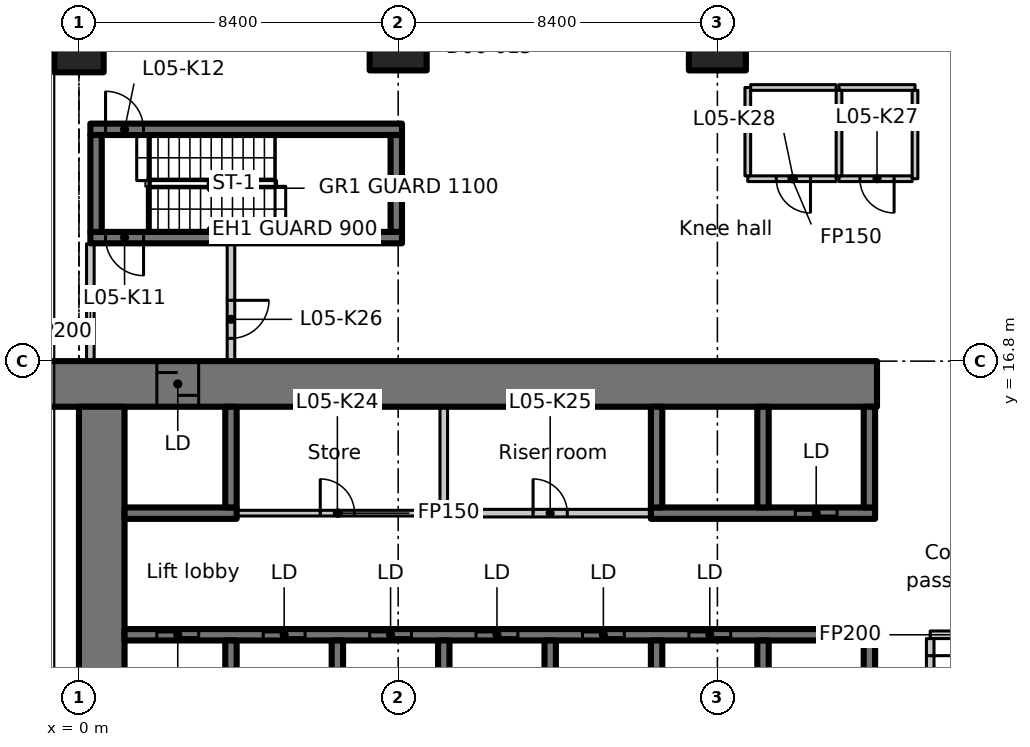
"""IFC4 building model, lengths in metres.
Left out: names, types, materials, properties, quantities, classifications, styles, units other than length and angle.
Written with IfcOpenShell. Run it as: python <this file> out.ifc"""

import sys

from ifc_helpers import new_model, si_unit, direction, frame, frame_2d, origin, origin_2d, place, context, subcontext, project, spatial, rectangle, extrude, element, fill, save


model = new_model("IFC4")
c1 = context("Model", 3, precision=1e-05, world=origin(), true_north=direction((0.0, 1.0)))
c2 = subcontext(c1, "Body", "Model", "MODEL_VIEW")
j1 = project(units=[si_unit("LENGTHUNIT", "METRE"), si_unit("PLANEANGLEUNIT", "RADIAN")], contexts=[c1])
p1 = place(None, origin())
s1 = spatial("IfcSite", under=j1, at=p1, CompositionType="ELEMENT")
p2 = place(p1, origin())
s2 = spatial("IfcBuilding", under=s1, at=p2, CompositionType="ELEMENT")
p3 = place(p2, frame((0.0, 0.0, 32.0)))
s3 = spatial("IfcBuildingStorey", under=s2, at=p3, CompositionType="ELEMENT", Elevation=32.0)
p4 = place(p3, frame((0.0, 25.2, 0.0), z_axis=(0.0, 0.0, 1.0), x_axis=(1.0, 0.0, 0.0)))
e1 = element("IfcColumn", 1, at=p4, inside=s3, PredefinedType="COLUMN", context=c2, shape_type="SweptSolid", body=[
    extrude(rectangle(XDim=1.3, YDim=1.6, at=origin_2d()), origin(), (0.0, 0.0, 1.0), 4.25),
])
for number, where, z_axis, x_axis in (
    (2, (8.4, 25.2, 0.0), (0.0, 0.0, 1.0), (1.0, 0.0, 0.0)),
    (3, (16.8, 25.2, 0.0), (0.0, 0.0, 1.0), (1.0, 0.0, 0.0)),
):
    element("IfcColumn", number, at=place(p3, frame(where, z_axis=z_axis, x_axis=x_axis)), inside=s3, PredefinedType="COLUMN", context=c2, shape_type="SweptSolid", body=[
        extrude(rectangle(XDim=1.5, YDim=1.5, at=origin_2d()), origin(), (0.0, 0.0, 1.0), 4.25),
    ])
p5 = place(p3, frame((-1.1, 16.2, 0.0), z_axis=(0.0, 0.0, 1.0), x_axis=(1.0, 0.0, 0.0)))
e4 = element("IfcWall", 4, at=p5, inside=s3, PredefinedType="SHEAR", context=c2, shape_type="SweptSolid", body=[
    extrude(rectangle(XDim=22.1, YDim=1.2, at=frame_2d((11.05, 0.0))), origin(), (0.0, 0.0, 1.0), 4.25),
])
p6 = place(p5, frame((3.15, 0.0, 0.0)))
e5 = element("IfcOpeningElement", 5, at=p6, cuts=e4, PredefinedType="OPENING", context=c2, shape_type="SweptSolid", body=[
    extrude(rectangle(XDim=1.1, YDim=2.3, at=frame_2d((0.55, 1.15))), frame((0.0, 0.61, 0.0), z_axis=(0.0, -1.0, 0.0), x_axis=(1.0, 0.0, 0.0)), (0.0, 0.0, 1.0), 1.22),
])
p7 = place(p3, frame((0.6, 6.736, 0.0), z_axis=(0.0, 0.0, 1.0), x_axis=(0.0, 1.0, 0.0)))
e6 = element("IfcWall", 6, at=p7, inside=s3, PredefinedType="SHEAR", context=c2, shape_type="SweptSolid", body=[
    extrude(rectangle(XDim=8.864, YDim=1.2, at=frame_2d((4.432, 0.0))), origin(), (0.0, 0.0, 1.0), 4.25),
])
p8 = place(p3, frame((1.2, 9.6, 0.0), z_axis=(0.0, 0.0, 1.0), x_axis=(1.0, 0.0, 0.0)))
e7 = element("IfcWall", 7, at=p8, inside=s3, PredefinedType="SHEAR", context=c2, shape_type="SweptSolid", body=[
    extrude(rectangle(XDim=19.75, YDim=0.3, at=frame_2d((9.875, 0.0))), origin(), (0.0, 0.0, 1.0), 4.25),
])
p9 = place(p8, frame((0.85, 0.0, 0.0)))
e8 = element("IfcOpeningElement", 8, at=p9, cuts=e7, PredefinedType="OPENING", context=c2, shape_type="SweptSolid", body=[
    extrude(rectangle(XDim=1.1, YDim=2.3, at=frame_2d((0.55, 1.15))), frame((0.0, 0.16, 0.0), z_axis=(0.0, -1.0, 0.0), x_axis=(1.0, 0.0, 0.0)), (0.0, 0.0, 1.0), 0.32),
])
p10 = place(p8, frame((3.65, 0.0, 0.0)))
e9 = element("IfcOpeningElement", 9, at=p10, cuts=e7, PredefinedType="OPENING", context=c2, shape_type="SweptSolid", body=[
    extrude(rectangle(XDim=1.1, YDim=2.3, at=frame_2d((0.55, 1.15))), frame((0.0, 0.16, 0.0), z_axis=(0.0, -1.0, 0.0), x_axis=(1.0, 0.0, 0.0)), (0.0, 0.0, 1.0), 0.32),
])
p11 = place(p8, frame((6.45, 0.0, 0.0)))
e10 = element("IfcOpeningElement", 10, at=p11, cuts=e7, PredefinedType="OPENING", context=c2, shape_type="SweptSolid", body=[
    extrude(rectangle(XDim=1.1, YDim=2.3, at=frame_2d((0.55, 1.15))), frame((0.0, 0.16, 0.0), z_axis=(0.0, -1.0, 0.0), x_axis=(1.0, 0.0, 0.0)), (0.0, 0.0, 1.0), 0.32),
])
p12 = place(p8, frame((9.25, 0.0, 0.0)))
e11 = element("IfcOpeningElement", 11, at=p12, cuts=e7, PredefinedType="OPENING", context=c2, shape_type="SweptSolid", body=[
    extrude(rectangle(XDim=1.1, YDim=2.3, at=frame_2d((0.55, 1.15))), frame((0.0, 0.16, 0.0), z_axis=(0.0, -1.0, 0.0), x_axis=(1.0, 0.0, 0.0)), (0.0, 0.0, 1.0), 0.32),
])
p13 = place(p8, frame((12.05, 0.0, 0.0)))
e12 = element("IfcOpeningElement", 12, at=p13, cuts=e7, PredefinedType="OPENING", context=c2, shape_type="SweptSolid", body=[
    extrude(rectangle(XDim=1.1, YDim=2.3, at=frame_2d((0.55, 1.15))), frame((0.0, 0.16, 0.0), z_axis=(0.0, -1.0, 0.0), x_axis=(1.0, 0.0, 0.0)), (0.0, 0.0, 1.0), 0.32),
])
p14 = place(p8, frame((14.85, 0.0, 0.0)))
e13 = element("IfcOpeningElement", 13, at=p14, cuts=e7, PredefinedType="OPENING", context=c2, shape_type="SweptSolid", body=[
    extrude(rectangle(XDim=1.1, YDim=2.3, at=frame_2d((0.55, 1.15))), frame((0.0, 0.16, 0.0), z_axis=(0.0, -1.0, 0.0), x_axis=(1.0, 0.0, 0.0)), (0.0, 0.0, 1.0), 0.32),
])
for number, where, z_axis, x_axis in (
    (14, (4.0, 7.15, 0.0), (0.0, 0.0, 1.0), (0.0, 1.0, 0.0)),
    (15, (6.8, 7.15, 0.0), (0.0, 0.0, 1.0), (0.0, 1.0, 0.0)),
    (16, (9.6, 7.15, 0.0), (0.0, 0.0, 1.0), (0.0, 1.0, 0.0)),
    (17, (12.4, 7.15, 0.0), (0.0, 0.0, 1.0), (0.0, 1.0, 0.0)),
    (18, (15.2, 7.15, 0.0), (0.0, 0.0, 1.0), (0.0, 1.0, 0.0)),
    (19, (18.0, 7.15, 0.0), (0.0, 0.0, 1.0), (0.0, 1.0, 0.0)),
    (20, (20.8, 7.15, 0.0), (0.0, 0.0, 1.0), (0.0, 1.0, 0.0)),
):
    element("IfcWall", number, at=place(p3, frame(where, z_axis=z_axis, x_axis=x_axis)), inside=s3, PredefinedType="SHEAR", context=c2, shape_type="SweptSolid", body=[
        extrude(rectangle(XDim=2.3, YDim=0.3, at=frame_2d((1.15, 0.0))), origin(), (0.0, 0.0, 1.0), 4.25),
    ])
p15 = place(p3, frame((1.2, 12.8, 0.0), z_axis=(0.0, 0.0, 1.0), x_axis=(1.0, 0.0, 0.0)))
e21 = element("IfcWall", 21, at=p15, inside=s3, PredefinedType="SHEAR", context=c2, shape_type="SweptSolid", body=[
    extrude(rectangle(XDim=2.95, YDim=0.3, at=frame_2d((1.475, 0.0))), origin(), (0.0, 0.0, 1.0), 4.25),
])
p16 = place(p3, frame((4.0, 12.95, 0.0), z_axis=(0.0, 0.0, 1.0), x_axis=(0.0, 1.0, 0.0)))
e22 = element("IfcWall", 22, at=p16, inside=s3, PredefinedType="SHEAR", context=c2, shape_type="SweptSolid", body=[
    extrude(rectangle(XDim=2.65, YDim=0.3, at=frame_2d((1.325, 0.0))), origin(), (0.0, 0.0, 1.0), 4.25),
])
p17 = place(p3, frame((15.05, 12.8, 0.0), z_axis=(0.0, 0.0, 1.0), x_axis=(1.0, 0.0, 0.0)))
e23 = element("IfcWall", 23, at=p17, inside=s3, PredefinedType="SHEAR", context=c2, shape_type="SweptSolid", body=[
    extrude(rectangle(XDim=5.9, YDim=0.3, at=frame_2d((2.95, 0.0))), origin(), (0.0, 0.0, 1.0), 4.25),
])
p18 = place(p17, frame((3.8, 0.0, 0.0)))
e24 = element("IfcOpeningElement", 24, at=p18, cuts=e23, PredefinedType="OPENING", context=c2, shape_type="SweptSolid", body=[
    extrude(rectangle(XDim=1.1, YDim=2.3, at=frame_2d((0.55, 1.15))), frame((0.0, 0.16, 0.0), z_axis=(0.0, -1.0, 0.0), x_axis=(1.0, 0.0, 0.0)), (0.0, 0.0, 1.0), 0.32),
])
for number, where, z_axis, x_axis in (
    (25, (15.2, 12.95, 0.0), (0.0, 0.0, 1.0), (0.0, 1.0, 0.0)),
    (26, (18.0, 12.95, 0.0), (0.0, 0.0, 1.0), (0.0, 1.0, 0.0)),
    (27, (20.8, 12.95, 0.0), (0.0, 0.0, 1.0), (0.0, 1.0, 0.0)),
):
    element("IfcWall", number, at=place(p3, frame(where, z_axis=z_axis, x_axis=x_axis)), inside=s3, PredefinedType="SHEAR", context=c2, shape_type="SweptSolid", body=[
        extrude(rectangle(XDim=2.65, YDim=0.3, at=frame_2d((1.325, 0.0))), origin(), (0.0, 0.0, 1.0), 4.25),
    ])
p19 = place(p3, frame((8.5, 20.05, 0.0), z_axis=(0.0, 0.0, 1.0), x_axis=(-1.0, 0.0, 0.0)))
e28 = element("IfcWall", 28, at=p19, inside=s3, PredefinedType="SHEAR", context=c2, shape_type="SweptSolid", body=[
    extrude(rectangle(XDim=8.2, YDim=0.3, at=frame_2d((4.1, 0.0))), origin(), (0.0, 0.0, 1.0), 4.25),
])
p20 = place(p19, frame((6.8, 0.0, 0.0)))
e29 = element("IfcOpeningElement", 29, at=p20, cuts=e28, PredefinedType="OPENING", context=c2, shape_type="SweptSolid", body=[
    extrude(rectangle(XDim=1.0, YDim=2.1, at=frame_2d((0.5, 1.05))), frame((0.0, 0.16, 0.0), z_axis=(0.0, -1.0, 0.0), x_axis=(1.0, 0.0, 0.0)), (0.0, 0.0, 1.0), 0.32),
])
p21 = place(p3, frame((0.3, 22.9, 0.0), z_axis=(0.0, 0.0, 1.0), x_axis=(1.0, 0.0, 0.0)))
e30 = element("IfcWall", 30, at=p21, inside=s3, PredefinedType="SHEAR", context=c2, shape_type="SweptSolid", body=[
    extrude(rectangle(XDim=8.2, YDim=0.3, at=frame_2d((4.1, 0.0))), origin(), (0.0, 0.0, 1.0), 4.25),
])
p22 = place(p21, frame((0.4, 0.0, 0.0)))
e31 = element("IfcOpeningElement", 31, at=p22, cuts=e30, PredefinedType="OPENING", context=c2, shape_type="SweptSolid", body=[
    extrude(rectangle(XDim=1.0, YDim=2.1, at=frame_2d((0.5, 1.05))), frame((0.0, 0.16, 0.0), z_axis=(0.0, -1.0, 0.0), x_axis=(1.0, 0.0, 0.0)), (0.0, 0.0, 1.0), 0.32),
])
for number, where, z_axis, x_axis in (
    (32, (0.45, 20.2, 0.0), (0.0, 0.0, 1.0), (0.0, 1.0, 0.0)),
    (33, (8.35, 20.2, 0.0), (0.0, 0.0, 1.0), (0.0, 1.0, 0.0)),
):
    element("IfcWall", number, at=place(p3, frame(where, z_axis=z_axis, x_axis=x_axis)), inside=s3, PredefinedType="SHEAR", context=c2, shape_type="SweptSolid", body=[
        extrude(rectangle(XDim=2.55, YDim=0.3, at=frame_2d((1.275, 0.0))), origin(), (0.0, 0.0, 1.0), 4.25),
    ])
p23 = place(p3, frame((0.3, 16.812, 0.0), z_axis=(0.0, 0.0, 1.0), x_axis=(0.0, 1.0, 0.0)))
e34 = element("IfcWall", 34, at=p23, inside=s3, PredefinedType="PARTITIONING", context=c2, shape_type="SweptSolid", body=[
    extrude(rectangle(XDim=3.076, YDim=0.2, at=frame_2d((1.538, 0.0))), origin(), (0.0, 0.0, 1.0), 3.88),
])
p24 = place(p3, frame((4.0, 19.888, 0.0), z_axis=(0.0, 0.0, 1.0), x_axis=(0.0, -1.0, 0.0)))
e35 = element("IfcWall", 35, at=p24, inside=s3, PredefinedType="PARTITIONING", context=c2, shape_type="SweptSolid", body=[
    extrude(rectangle(XDim=3.076, YDim=0.2, at=frame_2d((1.538, 0.0))), origin(), (0.0, 0.0, 1.0), 4.25),
])
p25 = place(p24, frame((1.488, 0.0, 0.0)))
e36 = element("IfcOpeningElement", 36, at=p25, cuts=e35, PredefinedType="OPENING", context=c2, shape_type="SweptSolid", body=[
    extrude(rectangle(XDim=1.0, YDim=2.1, at=frame_2d((0.5, 1.05))), frame((0.0, 0.11, 0.0), z_axis=(0.0, -1.0, 0.0), x_axis=(1.0, 0.0, 0.0)), (0.0, 0.0, 1.0), 0.22),
])
p26 = place(p3, frame((9.6, 15.588, 0.0), z_axis=(0.0, 0.0, 1.0), x_axis=(0.0, -1.0, 0.0)))
e37 = element("IfcWall", 37, at=p26, inside=s3, PredefinedType="PARTITIONING", context=c2, shape_type="SweptSolid", body=[
    extrude(rectangle(XDim=2.788, YDim=0.2, at=frame_2d((1.394, 0.0))), origin(), (0.0, 0.0, 1.0), 4.25),
])
p27 = place(p3, frame((9.7, 12.8, 0.0), z_axis=(0.0, 0.0, 1.0), x_axis=(1.0, 0.0, 0.0)))
e38 = element("IfcWall", 38, at=p27, inside=s3, PredefinedType="PARTITIONING", context=c2, shape_type="SweptSolid", body=[
    extrude(rectangle(XDim=5.338, YDim=0.2, at=frame_2d((2.669, 0.0))), origin(), (0.0, 0.0, 1.0), 4.25),
])
p28 = place(p27, frame((2.25, 0.0, 0.0)))
e39 = element("IfcOpeningElement", 39, at=p28, cuts=e38, PredefinedType="OPENING", context=c2, shape_type="SweptSolid", body=[
    extrude(rectangle(XDim=0.9, YDim=2.1, at=frame_2d((0.45, 1.05))), frame((0.0, 0.11, 0.0), z_axis=(0.0, -1.0, 0.0), x_axis=(1.0, 0.0, 0.0)), (0.0, 0.0, 1.0), 0.22),
])
p29 = place(p3, frame((23.988, 9.6, 0.0), z_axis=(0.0, 0.0, 1.0), x_axis=(-1.0, 0.0, 0.0)))
e40 = element("IfcWall", 40, at=p29, inside=s3, PredefinedType="PARTITIONING", context=c2, shape_type="SweptSolid", body=[
    extrude(rectangle(XDim=1.588, YDim=0.2, at=frame_2d((0.794, 0.0))), origin(), (0.0, 0.0, 1.0), 4.25),
])
p30 = place(p3, frame((22.4, 9.5, 0.0), z_axis=(0.0, 0.0, 1.0), x_axis=(0.0, -1.0, 0.0)))
e41 = element("IfcWall", 41, at=p30, inside=s3, PredefinedType="PARTITIONING", context=c2, shape_type="SweptSolid", body=[
    extrude(rectangle(XDim=1.9, YDim=0.2, at=frame_2d((0.95, 0.0))), origin(), (0.0, 0.0, 1.0), 4.25),
])
p31 = place(p30, frame((0.45, 0.0, 0.0)))
e42 = element("IfcOpeningElement", 42, at=p31, cuts=e41, PredefinedType="OPENING", context=c2, shape_type="SweptSolid", body=[
    extrude(rectangle(XDim=0.9, YDim=2.1, at=frame_2d((0.45, 1.05))), frame((0.0, 0.11, 0.0), z_axis=(0.0, -1.0, 0.0), x_axis=(1.0, 0.0, 0.0)), (0.0, 0.0, 1.0), 0.22),
])
p32 = place(p3, frame((4.162, 12.8, 0.0), z_axis=(0.0, 0.0, 1.0), x_axis=(1.0, 0.0, 0.0)))
e43 = element("IfcWall", 43, at=p32, inside=s3, PredefinedType="PARTITIONING", context=c2, shape_type="SweptSolid", body=[
    extrude(rectangle(XDim=5.338, YDim=0.15, at=frame_2d((2.669, 0.0))), origin(), (0.0, 0.0, 1.0), 4.25),
])
p33 = place(p32, frame((2.188, 0.0, 0.0)))
e44 = element("IfcOpeningElement", 44, at=p33, cuts=e43, PredefinedType="OPENING", context=c2, shape_type="SweptSolid", body=[
    extrude(rectangle(XDim=0.9, YDim=2.1, at=frame_2d((0.45, 1.05))), frame((0.0, 0.085, 0.0), z_axis=(0.0, -1.0, 0.0), x_axis=(1.0, 0.0, 0.0)), (0.0, 0.0, 1.0), 0.17),
])
p34 = place(p3, frame((20.0, 24.0, 0.0), z_axis=(0.0, 0.0, 1.0), x_axis=(1.0, 0.0, 0.0)))
e45 = element("IfcWall", 45, at=p34, inside=s3, PredefinedType="PARTITIONING", context=c2, shape_type="SweptSolid", body=[
    extrude(rectangle(XDim=2.0, YDim=0.15, at=frame_2d((1.0, 0.0))), origin(), (0.0, 0.0, 1.0), 4.25),
])
p35 = place(p3, frame((22.0, 23.925, 0.0), z_axis=(0.0, 0.0, 1.0), x_axis=(0.0, -1.0, 0.0)))
e46 = element("IfcWall", 46, at=p35, inside=s3, PredefinedType="PARTITIONING", context=c2, shape_type="SweptSolid", body=[
    extrude(rectangle(XDim=2.325, YDim=0.15, at=frame_2d((1.163, 0.0))), origin(), (0.0, 0.0, 1.0), 4.25),
])
p36 = place(p3, frame((21.925, 21.6, 0.0), z_axis=(0.0, 0.0, 1.0), x_axis=(-1.0, 0.0, 0.0)))
e47 = element("IfcWall", 47, at=p36, inside=s3, PredefinedType="PARTITIONING", context=c2, shape_type="SweptSolid", body=[
    extrude(rectangle(XDim=1.925, YDim=0.15, at=frame_2d((0.962, 0.0))), origin(), (0.0, 0.0, 1.0), 4.25),
])
p37 = place(p36, frame((0.475, 0.0, 0.0)))
e48 = element("IfcOpeningElement", 48, at=p37, cuts=e47, PredefinedType="OPENING", context=c2, shape_type="SweptSolid", body=[
    extrude(rectangle(XDim=0.9, YDim=2.1, at=frame_2d((0.45, 1.05))), frame((0.0, 0.085, 0.0), z_axis=(0.0, -1.0, 0.0), x_axis=(1.0, 0.0, 0.0)), (0.0, 0.0, 1.0), 0.17),
])
p38 = place(p3, frame((20.0, 21.675, 0.0), z_axis=(0.0, 0.0, 1.0), x_axis=(0.0, 1.0, 0.0)))
e49 = element("IfcWall", 49, at=p38, inside=s3, PredefinedType="PARTITIONING", context=c2, shape_type="SweptSolid", body=[
    extrude(rectangle(XDim=2.25, YDim=0.15, at=frame_2d((1.125, 0.0))), origin(), (0.0, 0.0, 1.0), 4.25),
])
p39 = place(p3, frame((19.925, 21.6, 0.0), z_axis=(0.0, 0.0, 1.0), x_axis=(-1.0, 0.0, 0.0)))
e50 = element("IfcWall", 50, at=p39, inside=s3, PredefinedType="PARTITIONING", context=c2, shape_type="SweptSolid", body=[
    extrude(rectangle(XDim=2.325, YDim=0.15, at=frame_2d((1.163, 0.0))), origin(), (0.0, 0.0, 1.0), 4.25),
])
p40 = place(p39, frame((0.675, 0.0, 0.0)))
e51 = element("IfcOpeningElement", 51, at=p40, cuts=e50, PredefinedType="OPENING", context=c2, shape_type="SweptSolid", body=[
    extrude(rectangle(XDim=0.9, YDim=2.1, at=frame_2d((0.45, 1.05))), frame((0.0, 0.085, 0.0), z_axis=(0.0, -1.0, 0.0), x_axis=(1.0, 0.0, 0.0)), (0.0, 0.0, 1.0), 0.17),
])
p41 = place(p3, frame((17.6, 21.675, 0.0), z_axis=(0.0, 0.0, 1.0), x_axis=(0.0, 1.0, 0.0)))
e52 = element("IfcWall", 52, at=p41, inside=s3, PredefinedType="PARTITIONING", context=c2, shape_type="SweptSolid", body=[
    extrude(rectangle(XDim=2.325, YDim=0.15, at=frame_2d((1.163, 0.0))), origin(), (0.0, 0.0, 1.0), 4.25),
])
p42 = place(p3, frame((17.675, 24.0, 0.0), z_axis=(0.0, 0.0, 1.0), x_axis=(1.0, 0.0, 0.0)))
e53 = element("IfcWall", 53, at=p42, inside=s3, PredefinedType="PARTITIONING", context=c2, shape_type="SweptSolid", body=[
    extrude(rectangle(XDim=2.25, YDim=0.15, at=frame_2d((1.125, 0.0))), origin(), (0.0, 0.0, 1.0), 4.25),
])
p43 = place(p9, origin())
e54 = element("IfcDoor", 54, at=p43, inside=s3, OperationType="SLIDING_TO_LEFT", PredefinedType="DOOR", context=c2, shape_type="SweptSolid", body=[
    extrude(rectangle(XDim=1.1, YDim=2.3, at=frame_2d((0.55, 1.15))), frame((0.0, 0.025, 0.0), z_axis=(0.0, -1.0, 0.0), x_axis=(1.0, 0.0, 0.0)), (0.0, 0.0, 1.0), 0.05),
])
fill(e8, e54)
p44 = place(p10, origin())
e55 = element("IfcDoor", 55, at=p44, inside=s3, OperationType="SLIDING_TO_LEFT", PredefinedType="DOOR", context=c2, shape_type="SweptSolid", body=[
    extrude(rectangle(XDim=1.1, YDim=2.3, at=frame_2d((0.55, 1.15))), frame((0.0, 0.025, 0.0), z_axis=(0.0, -1.0, 0.0), x_axis=(1.0, 0.0, 0.0)), (0.0, 0.0, 1.0), 0.05),
])
fill(e9, e55)
p45 = place(p11, origin())
e56 = element("IfcDoor", 56, at=p45, inside=s3, OperationType="SLIDING_TO_LEFT", PredefinedType="DOOR", context=c2, shape_type="SweptSolid", body=[
    extrude(rectangle(XDim=1.1, YDim=2.3, at=frame_2d((0.55, 1.15))), frame((0.0, 0.025, 0.0), z_axis=(0.0, -1.0, 0.0), x_axis=(1.0, 0.0, 0.0)), (0.0, 0.0, 1.0), 0.05),
])
fill(e10, e56)
p46 = place(p12, origin())
e57 = element("IfcDoor", 57, at=p46, inside=s3, OperationType="SLIDING_TO_LEFT", PredefinedType="DOOR", context=c2, shape_type="SweptSolid", body=[
    extrude(rectangle(XDim=1.1, YDim=2.3, at=frame_2d((0.55, 1.15))), frame((0.0, 0.025, 0.0), z_axis=(0.0, -1.0, 0.0), x_axis=(1.0, 0.0, 0.0)), (0.0, 0.0, 1.0), 0.05),
])
fill(e11, e57)
p47 = place(p13, origin())
e58 = element("IfcDoor", 58, at=p47, inside=s3, OperationType="SLIDING_TO_LEFT", PredefinedType="DOOR", context=c2, shape_type="SweptSolid", body=[
    extrude(rectangle(XDim=1.1, YDim=2.3, at=frame_2d((0.55, 1.15))), frame((0.0, 0.025, 0.0), z_axis=(0.0, -1.0, 0.0), x_axis=(1.0, 0.0, 0.0)), (0.0, 0.0, 1.0), 0.05),
])
fill(e12, e58)
p48 = place(p14, origin())
e59 = element("IfcDoor", 59, at=p48, inside=s3, OperationType="SLIDING_TO_LEFT", PredefinedType="DOOR", context=c2, shape_type="SweptSolid", body=[
    extrude(rectangle(XDim=1.1, YDim=2.3, at=frame_2d((0.55, 1.15))), frame((0.0, 0.025, 0.0), z_axis=(0.0, -1.0, 0.0), x_axis=(1.0, 0.0, 0.0)), (0.0, 0.0, 1.0), 0.05),
])
fill(e13, e59)
p49 = place(p6, origin())
e60 = element("IfcDoor", 60, at=p49, inside=s3, OperationType="SLIDING_TO_LEFT", PredefinedType="DOOR", context=c2, shape_type="SweptSolid", body=[
    extrude(rectangle(XDim=1.1, YDim=2.3, at=frame_2d((0.55, 1.15))), frame((0.0, 0.025, 0.0), z_axis=(0.0, -1.0, 0.0), x_axis=(1.0, 0.0, 0.0)), (0.0, 0.0, 1.0), 0.05),
])
fill(e5, e60)
p50 = place(p18, origin())
e61 = element("IfcDoor", 61, at=p50, inside=s3, OperationType="SLIDING_TO_LEFT", PredefinedType="DOOR", context=c2, shape_type="SweptSolid", body=[
    extrude(rectangle(XDim=1.1, YDim=2.3, at=frame_2d((0.55, 1.15))), frame((0.0, 0.025, 0.0), z_axis=(0.0, -1.0, 0.0), x_axis=(1.0, 0.0, 0.0)), (0.0, 0.0, 1.0), 0.05),
])
fill(e24, e61)
p51 = place(p20, origin())
e62 = element("IfcDoor", 62, at=p51, inside=s3, OperationType="SINGLE_SWING_RIGHT", PredefinedType="DOOR", context=c2, shape_type="SweptSolid", body=[
    extrude(rectangle(XDim=1.0, YDim=2.1, at=frame_2d((0.5, 1.05))), frame((0.0, 0.025, 0.0), z_axis=(0.0, -1.0, 0.0), x_axis=(1.0, 0.0, 0.0)), (0.0, 0.0, 1.0), 0.05),
])
fill(e29, e62)
p52 = place(p22, origin())
e63 = element("IfcDoor", 63, at=p52, inside=s3, OperationType="SINGLE_SWING_LEFT", PredefinedType="DOOR", context=c2, shape_type="SweptSolid", body=[
    extrude(rectangle(XDim=1.0, YDim=2.1, at=frame_2d((0.5, 1.05))), frame((0.0, 0.025, 0.0), z_axis=(0.0, -1.0, 0.0), x_axis=(1.0, 0.0, 0.0)), (0.0, 0.0, 1.0), 0.05),
])
fill(e31, e63)
p53 = place(p31, origin())
e64 = element("IfcDoor", 64, at=p53, inside=s3, OperationType="SINGLE_SWING_RIGHT", PredefinedType="DOOR", context=c2, shape_type="SweptSolid", body=[
    extrude(rectangle(XDim=0.9, YDim=2.1, at=frame_2d((0.45, 1.05))), frame((0.0, 0.025, 0.0), z_axis=(0.0, -1.0, 0.0), x_axis=(1.0, 0.0, 0.0)), (0.0, 0.0, 1.0), 0.05),
])
fill(e42, e64)
p54 = place(p33, origin())
e65 = element("IfcDoor", 65, at=p54, inside=s3, OperationType="SINGLE_SWING_LEFT", PredefinedType="DOOR", context=c2, shape_type="SweptSolid", body=[
    extrude(rectangle(XDim=0.9, YDim=2.1, at=frame_2d((0.45, 1.05))), frame((0.0, 0.025, 0.0), z_axis=(0.0, -1.0, 0.0), x_axis=(1.0, 0.0, 0.0)), (0.0, 0.0, 1.0), 0.05),
])
fill(e44, e65)
p55 = place(p28, origin())
e66 = element("IfcDoor", 66, at=p55, inside=s3, OperationType="SINGLE_SWING_RIGHT", PredefinedType="DOOR", context=c2, shape_type="SweptSolid", body=[
    extrude(rectangle(XDim=0.9, YDim=2.1, at=frame_2d((0.45, 1.05))), frame((0.0, 0.025, 0.0), z_axis=(0.0, -1.0, 0.0), x_axis=(1.0, 0.0, 0.0)), (0.0, 0.0, 1.0), 0.05),
])
fill(e39, e66)
p56 = place(p25, origin())
e67 = element("IfcDoor", 67, at=p56, inside=s3, OperationType="SINGLE_SWING_LEFT", PredefinedType="DOOR", context=c2, shape_type="SweptSolid", body=[
    extrude(rectangle(XDim=1.0, YDim=2.1, at=frame_2d((0.5, 1.05))), frame((0.0, 0.025, 0.0), z_axis=(0.0, -1.0, 0.0), x_axis=(1.0, 0.0, 0.0)), (0.0, 0.0, 1.0), 0.05),
])
fill(e36, e67)
p57 = place(p37, origin())
e68 = element("IfcDoor", 68, at=p57, inside=s3, OperationType="SINGLE_SWING_RIGHT", PredefinedType="DOOR", context=c2, shape_type="SweptSolid", body=[
    extrude(rectangle(XDim=0.9, YDim=2.1, at=frame_2d((0.45, 1.05))), frame((0.0, 0.025, 0.0), z_axis=(0.0, -1.0, 0.0), x_axis=(1.0, 0.0, 0.0)), (0.0, 0.0, 1.0), 0.05),
])
fill(e48, e68)
p58 = place(p40, origin())
e69 = element("IfcDoor", 69, at=p58, inside=s3, OperationType="SINGLE_SWING_LEFT", PredefinedType="DOOR", context=c2, shape_type="SweptSolid", body=[
    extrude(rectangle(XDim=0.9, YDim=2.1, at=frame_2d((0.45, 1.05))), frame((0.0, 0.025, 0.0), z_axis=(0.0, -1.0, 0.0), x_axis=(1.0, 0.0, 0.0)), (0.0, 0.0, 1.0), 0.05),
])
fill(e51, e69)
save(model, sys.argv[1])
